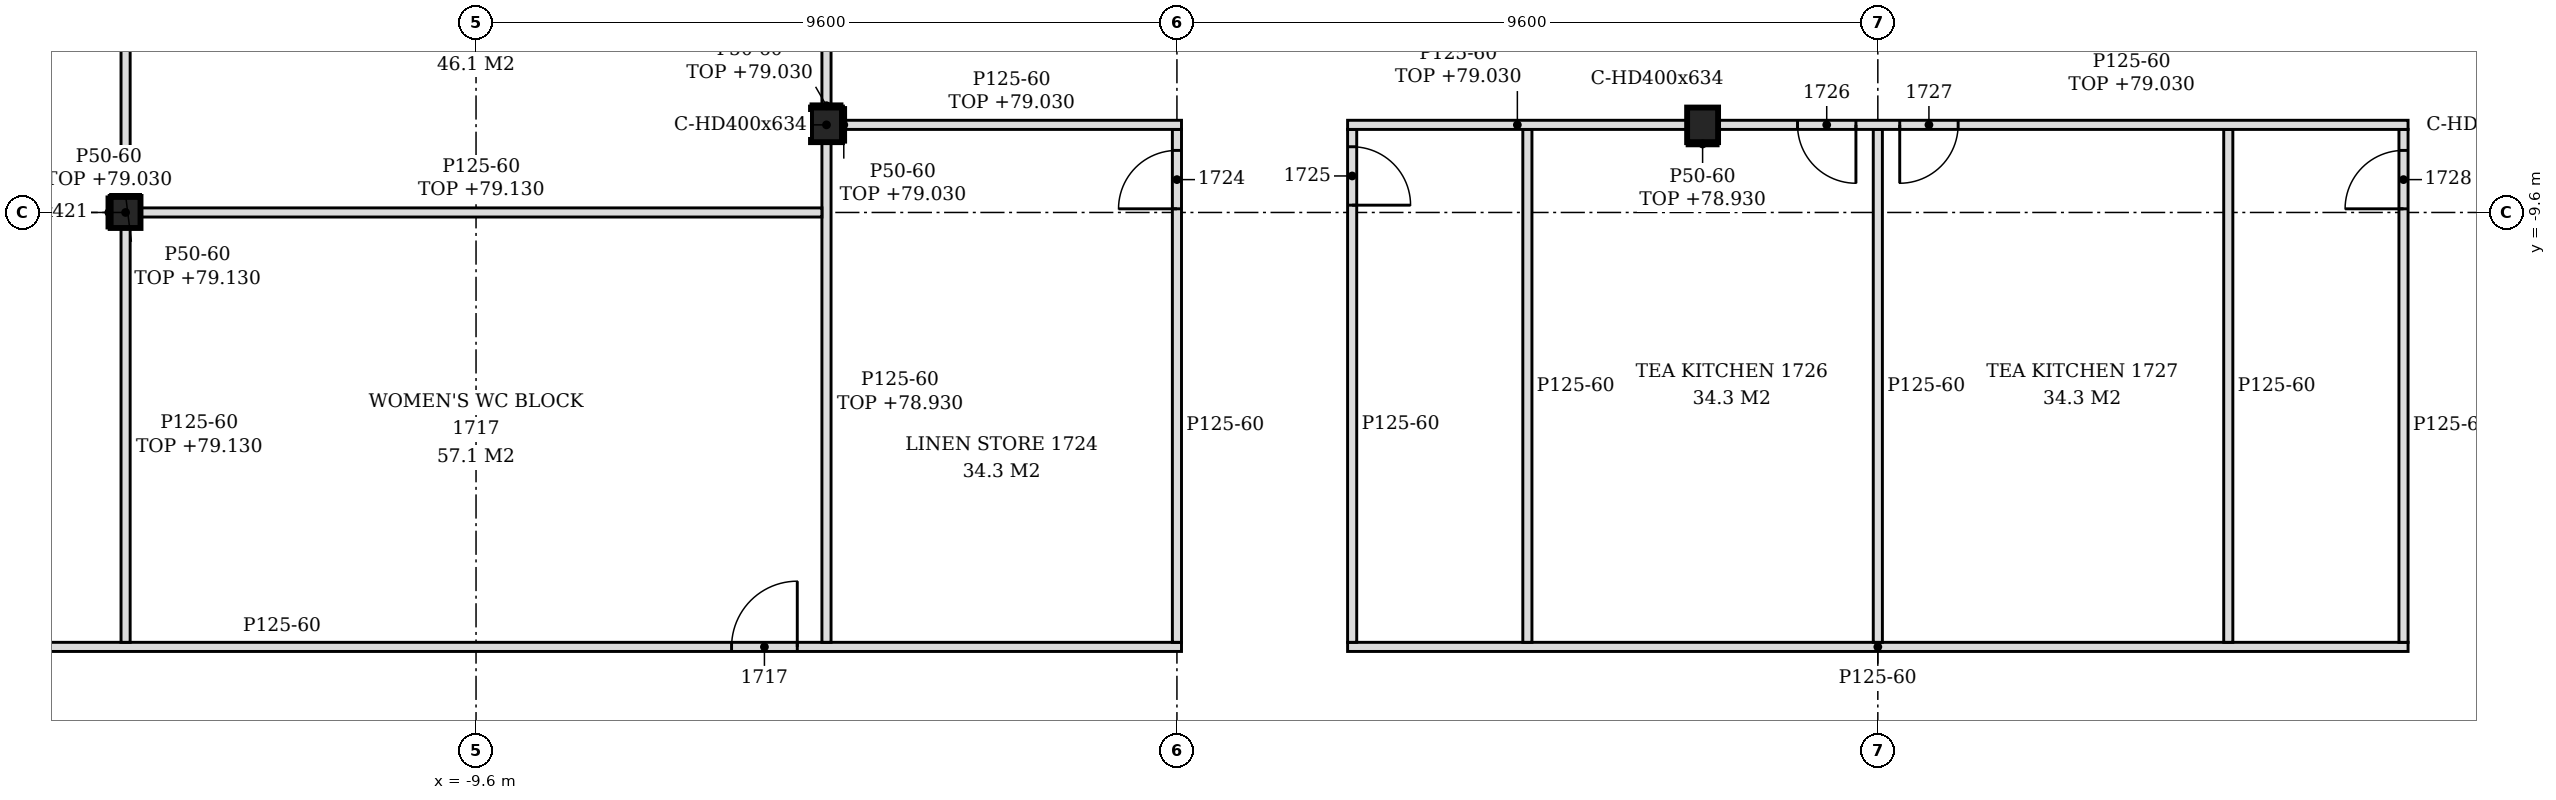
"""IFC4 building model, lengths in metres.
Left out: names, types, materials, properties, quantities, classifications, styles, units other than length and angle.
Written with IfcOpenShell. Run it as: python <this file> out.ifc"""

import sys

from ifc_helpers import new_model, si_unit, direction, frame, frame_2d, origin, origin_2d, place, context, subcontext, project, spatial, polyline, rectangle, i_section, outline, extrude, element, fill, save


model = new_model("IFC4")
c1 = context("Model", 3, precision=1e-05, world=origin(), true_north=direction((0.0, 1.0)))
c2 = subcontext(c1, "Body", "Model", "MODEL_VIEW")
j1 = project(units=[si_unit("LENGTHUNIT", "METRE"), si_unit("PLANEANGLEUNIT", "RADIAN")], contexts=[c1])
p1 = place(None, origin())
s1 = spatial("IfcSite", under=j1, at=p1, CompositionType="ELEMENT")
p2 = place(p1, origin())
s2 = spatial("IfcBuilding", under=s1, at=p2, CompositionType="ELEMENT")
p3 = place(p2, frame((0.0, 0.0, 76.2)))
s3 = spatial("IfcBuildingStorey", under=s2, at=p3, CompositionType="ELEMENT", Elevation=76.2)
for number, where, z_axis, x_axis in (
    (1, (-4.8, -8.4, -0.15), (0.0, 0.0, 1.0), (1.0, 0.0, 0.0)),
    (2, (7.2, -8.4, -0.15), (0.0, 0.0, 1.0), (1.0, 0.0, 0.0)),
):
    element("IfcColumn", number, at=place(p3, frame(where, z_axis=z_axis, x_axis=x_axis)), inside=s3, PredefinedType="COLUMN", context=c2, shape_type="SweptSolid", body=[
        extrude(i_section(OverallWidth=0.424, OverallDepth=0.474, WebThickness=0.048, FlangeThickness=0.077, FilletRadius=0.015, at=origin_2d()), origin(), (0.0, 0.0, 1.0), 3.6),
    ])
p4 = place(p3, frame((-14.4, -9.6, -0.15), z_axis=(0.0, 0.0, 1.0), x_axis=(1.0, 0.0, 0.0)))
e3 = element("IfcColumn", 3, at=p4, inside=s3, PredefinedType="COLUMN", context=c2, shape_type="SweptSolid", body=[
    extrude(i_section(OverallWidth=0.409, OverallDepth=0.425, WebThickness=0.033, FlangeThickness=0.052, FilletRadius=0.015, at=origin_2d()), origin(), (0.0, 0.0, 1.0), 3.6),
])
p5 = place(p3, frame((-18.413, -15.55, 0.0), z_axis=(0.0, 0.0, 1.0), x_axis=(1.0, 0.0, 0.0)))
e4 = element("IfcWall", 4, at=p5, inside=s3, PredefinedType="PARTITIONING", context=c2, shape_type="SweptSolid", body=[
    extrude(outline(polyline([(0.0, 0.0), (18.475, 0.0), (18.475, 3.45), (13.762, 3.45), (13.76, 2.73), (13.462, 2.73), (13.46, 3.45), (4.163, 3.45), (4.16, 2.93), (3.863, 2.93), (3.861, 3.45), (0.0, 3.45), (0.0, 0.0)])), frame((0.0, 0.062, 0.0), z_axis=(0.0, -1.0, 0.0), x_axis=(1.0, 0.0, 0.0)), (0.0, 0.0, 1.0), 0.125),
])
p6 = place(p5, frame((12.312, 0.0, 0.0)))
e5 = element("IfcOpeningElement", 5, at=p6, cuts=e4, PredefinedType="OPENING", context=c2, shape_type="SweptSolid", body=[
    extrude(rectangle(XDim=0.9, YDim=2.1, at=frame_2d((0.45, 1.05))), frame((0.0, 0.073, 0.0), z_axis=(0.0, -1.0, 0.0), x_axis=(1.0, 0.0, 0.0)), (0.0, 0.0, 1.0), 0.145),
])
p7 = place(p3, frame((2.337, -15.55, 0.0), z_axis=(0.0, 0.0, 1.0), x_axis=(1.0, 0.0, 0.0)))
e6 = element("IfcWall", 6, at=p7, inside=s3, PredefinedType="PARTITIONING", context=c2, shape_type="SweptSolid", body=[
    extrude(outline(polyline([(0.0, 0.0), (14.525, 0.0), (14.525, 3.45), (5.012, 3.45), (5.01, 2.73), (4.712, 2.73), (4.71, 3.45), (0.0, 3.45), (0.0, 0.0)])), frame((0.0, 0.062, 0.0), z_axis=(0.0, -1.0, 0.0), x_axis=(1.0, 0.0, 0.0)), (0.0, 0.0, 1.0), 0.125),
])
p8 = place(p3, frame((-14.4, -15.488, 0.0), z_axis=(0.0, 0.0, 1.0), x_axis=(0.0, 1.0, 0.0)))
e7 = element("IfcWall", 7, at=p8, inside=s3, PredefinedType="PARTITIONING", context=c2, shape_type="SweptSolid", body=[
    extrude(rectangle(XDim=5.675, YDim=0.125, at=frame_2d((2.837, 0.0))), origin(), (0.0, 0.0, 1.0), 2.93),
])
p9 = place(p3, frame((-4.8, -15.488, 0.0), z_axis=(0.0, 0.0, 1.0), x_axis=(0.0, 1.0, 0.0)))
e8 = element("IfcWall", 8, at=p9, inside=s3, PredefinedType="PARTITIONING", context=c2, shape_type="SweptSolid", body=[
    extrude(rectangle(XDim=6.851, YDim=0.125, at=frame_2d((3.425, 0.0))), origin(), (0.0, 0.0, 1.0), 2.73),
])
p10 = place(p3, frame((0.0, -15.488, 0.0), z_axis=(0.0, 0.0, 1.0), x_axis=(0.0, 1.0, 0.0)))
e9 = element("IfcWall", 9, at=p10, inside=s3, PredefinedType="PARTITIONING", context=c2, shape_type="SweptSolid", body=[
    extrude(outline(polyline([(0.0, 0.0), (7.025, 0.0), (7.025, 2.83), (6.938, 2.83), (6.936, 3.45), (1.192, 3.45), (1.19, 2.88), (0.982, 2.88), (0.98, 3.45), (0.0, 3.45), (0.0, 0.0)])), frame((0.0, 0.062, 0.0), z_axis=(0.0, -1.0, 0.0), x_axis=(1.0, 0.0, 0.0)), (0.0, 0.0, 1.0), 0.125),
])
p11 = place(p10, frame((5.938, 0.0, 0.0)))
e10 = element("IfcOpeningElement", 10, at=p11, cuts=e9, PredefinedType="OPENING", context=c2, shape_type="SweptSolid", body=[
    extrude(rectangle(XDim=0.8, YDim=2.1, at=frame_2d((0.4, 1.05))), frame((0.0, 0.073, 0.0), z_axis=(0.0, -1.0, 0.0), x_axis=(1.0, 0.0, 0.0)), (0.0, 0.0, 1.0), 0.145),
])
p12 = place(p3, frame((2.4, -15.488, 0.0), z_axis=(0.0, 0.0, 1.0), x_axis=(0.0, 1.0, 0.0)))
e11 = element("IfcWall", 11, at=p12, inside=s3, PredefinedType="PARTITIONING", context=c2, shape_type="SweptSolid", body=[
    extrude(outline(polyline([(0.0, 0.0), (7.025, 0.0), (7.025, 2.83), (6.938, 2.83), (6.936, 3.45), (1.192, 3.45), (1.19, 2.88), (0.982, 2.88), (0.98, 3.45), (0.0, 3.45), (0.0, 0.0)])), frame((0.0, 0.062, 0.0), z_axis=(0.0, -1.0, 0.0), x_axis=(1.0, 0.0, 0.0)), (0.0, 0.0, 1.0), 0.125),
])
p13 = place(p12, frame((5.988, 0.0, 0.0)))
e12 = element("IfcOpeningElement", 12, at=p13, cuts=e11, PredefinedType="OPENING", context=c2, shape_type="SweptSolid", body=[
    extrude(rectangle(XDim=0.8, YDim=2.1, at=frame_2d((0.4, 1.05))), frame((0.0, 0.073, 0.0), z_axis=(0.0, -1.0, 0.0), x_axis=(1.0, 0.0, 0.0)), (0.0, 0.0, 1.0), 0.145),
])
for number, where, z_axis, x_axis in (
    (13, (4.8, -15.488, 0.0), (0.0, 0.0, 1.0), (0.0, 1.0, 0.0)),
    (14, (9.6, -15.488, 0.0), (0.0, 0.0, 1.0), (0.0, 1.0, 0.0)),
    (15, (14.4, -15.488, 0.0), (0.0, 0.0, 1.0), (0.0, 1.0, 0.0)),
):
    element("IfcWall", number, at=place(p3, frame(where, z_axis=z_axis, x_axis=x_axis)), inside=s3, PredefinedType="PARTITIONING", context=c2, shape_type="SweptSolid", body=[
        extrude(outline(polyline([(0.0, 0.0), (7.025, 0.0), (7.025, 2.83), (6.938, 2.83), (6.936, 3.45), (1.192, 3.45), (1.19, 2.88), (0.982, 2.88), (0.98, 3.45), (0.0, 3.45), (0.0, 0.0)])), frame((0.0, 0.062, 0.0), z_axis=(0.0, -1.0, 0.0), x_axis=(1.0, 0.0, 0.0)), (0.0, 0.0, 1.0), 0.125),
    ])
p14 = place(p3, frame((16.8, -15.488, 0.0), z_axis=(0.0, 0.0, 1.0), x_axis=(0.0, 1.0, 0.0)))
e16 = element("IfcWall", 16, at=p14, inside=s3, PredefinedType="PARTITIONING", context=c2, shape_type="SweptSolid", body=[
    extrude(outline(polyline([(0.0, 0.0), (7.025, 0.0), (7.025, 2.83), (6.938, 2.83), (6.936, 3.45), (1.192, 3.45), (1.19, 2.88), (0.982, 2.88), (0.98, 3.45), (0.0, 3.45), (0.0, 0.0)])), frame((0.0, 0.062, 0.0), z_axis=(0.0, -1.0, 0.0), x_axis=(1.0, 0.0, 0.0)), (0.0, 0.0, 1.0), 0.125),
])
p15 = place(p14, frame((5.938, 0.0, 0.0)))
e17 = element("IfcOpeningElement", 17, at=p15, cuts=e16, PredefinedType="OPENING", context=c2, shape_type="SweptSolid", body=[
    extrude(rectangle(XDim=0.8, YDim=2.1, at=frame_2d((0.4, 1.05))), frame((0.0, 0.073, 0.0), z_axis=(0.0, -1.0, 0.0), x_axis=(1.0, 0.0, 0.0)), (0.0, 0.0, 1.0), 0.145),
])
p16 = place(p3, frame((-14.196, -9.6, 0.0), z_axis=(0.0, 0.0, 1.0), x_axis=(1.0, 0.0, 0.0)))
e18 = element("IfcWall", 18, at=p16, inside=s3, PredefinedType="PARTITIONING", context=c2, shape_type="SweptSolid", body=[
    extrude(outline(polyline([(0.0, 0.0), (9.333, 0.0), (9.333, 2.73), (9.246, 2.73), (9.243, 2.93), (0.0, 2.93), (0.0, 0.0)])), frame((0.0, 0.062, 0.0), z_axis=(0.0, -1.0, 0.0), x_axis=(1.0, 0.0, 0.0)), (0.0, 0.0, 1.0), 0.125),
])
p17 = place(p3, frame((-14.4, -9.387, 0.0), z_axis=(0.0, 0.0, 1.0), x_axis=(0.0, 1.0, 0.0)))
e19 = element("IfcWall", 19, at=p17, inside=s3, PredefinedType="PARTITIONING", context=c2, shape_type="SweptSolid", body=[
    extrude(rectangle(XDim=9.175, YDim=0.125, at=frame_2d((4.587, 0.0))), origin(), (0.0, 0.0, 1.0), 2.93),
])
p18 = place(p3, frame((-4.588, -8.4, 0.0), z_axis=(0.0, 0.0, 1.0), x_axis=(1.0, 0.0, 0.0)))
e20 = element("IfcWall", 20, at=p18, inside=s3, PredefinedType="PARTITIONING", context=c2, shape_type="SweptSolid", body=[
    extrude(rectangle(XDim=4.65, YDim=0.125, at=frame_2d((2.325, 0.0))), origin(), (0.0, 0.0, 1.0), 2.83),
])
p19 = place(p3, frame((2.337, -8.4, 0.0), z_axis=(0.0, 0.0, 1.0), x_axis=(1.0, 0.0, 0.0)))
e21 = element("IfcWall", 21, at=p19, inside=s3, PredefinedType="PARTITIONING", context=c2, shape_type="SweptSolid", body=[
    extrude(rectangle(XDim=4.651, YDim=0.125, at=frame_2d((2.325, 0.0))), origin(), (0.0, 0.0, 1.0), 2.83),
])
p20 = place(p3, frame((7.412, -8.4, 0.0), z_axis=(0.0, 0.0, 1.0), x_axis=(1.0, 0.0, 0.0)))
e22 = element("IfcWall", 22, at=p20, inside=s3, PredefinedType="PARTITIONING", context=c2, shape_type="SweptSolid", body=[
    extrude(rectangle(XDim=9.45, YDim=0.125, at=frame_2d((4.725, 0.0))), origin(), (0.0, 0.0, 1.0), 2.83),
])
p21 = place(p20, frame((1.088, 0.0, 0.0)))
e23 = element("IfcOpeningElement", 23, at=p21, cuts=e22, PredefinedType="OPENING", context=c2, shape_type="SweptSolid", body=[
    extrude(rectangle(XDim=0.8, YDim=2.1, at=frame_2d((0.4, 1.05))), frame((0.0, 0.073, 0.0), z_axis=(0.0, -1.0, 0.0), x_axis=(1.0, 0.0, 0.0)), (0.0, 0.0, 1.0), 0.145),
])
p22 = place(p20, frame((2.488, 0.0, 0.0)))
e24 = element("IfcOpeningElement", 24, at=p22, cuts=e22, PredefinedType="OPENING", context=c2, shape_type="SweptSolid", body=[
    extrude(rectangle(XDim=0.8, YDim=2.1, at=frame_2d((0.4, 1.05))), frame((0.0, 0.073, 0.0), z_axis=(0.0, -1.0, 0.0), x_axis=(1.0, 0.0, 0.0)), (0.0, 0.0, 1.0), 0.145),
])
p23 = place(p3, frame((-4.8, -8.163, 0.0), z_axis=(0.0, 0.0, 1.0), x_axis=(0.0, 1.0, 0.0)))
e25 = element("IfcWall", 25, at=p23, inside=s3, PredefinedType="PARTITIONING", context=c2, shape_type="SweptSolid", body=[
    extrude(rectangle(XDim=8.101, YDim=0.125, at=frame_2d((4.05, 0.0))), origin(), (0.0, 0.0, 1.0), 2.83),
])
p24 = place(p23, frame((2.163, 0.0, 0.0)))
e26 = element("IfcOpeningElement", 26, at=p24, cuts=e25, PredefinedType="OPENING", context=c2, shape_type="SweptSolid", body=[
    extrude(rectangle(XDim=0.9, YDim=2.1, at=frame_2d((0.45, 1.05))), frame((0.0, 0.073, 0.0), z_axis=(0.0, -1.0, 0.0), x_axis=(1.0, 0.0, 0.0)), (0.0, 0.0, 1.0), 0.145),
])
p25 = place(p3, frame((-14.629, -9.812, 0.0), z_axis=(0.0, 0.0, 1.0), x_axis=(0.0, 1.0, 0.0)))
e27 = element("IfcWall", 27, at=p25, inside=s3, PredefinedType="PARTITIONING", context=c2, shape_type="SweptSolid", body=[
    extrude(rectangle(XDim=0.425, YDim=0.05, at=frame_2d((0.212, 0.0))), origin(), (0.0, 0.0, 1.0), 2.83),
])
p26 = place(p3, frame((-4.563, -8.637, 0.0), z_axis=(0.0, 0.0, 1.0), x_axis=(0.0, 1.0, 0.0)))
e28 = element("IfcWall", 28, at=p26, inside=s3, PredefinedType="PARTITIONING", context=c2, shape_type="SweptSolid", body=[
    extrude(rectangle(XDim=0.474, YDim=0.05, at=frame_2d((0.237, 0.0))), origin(), (0.0, 0.0, 1.0), 2.83),
])
p27 = place(p3, frame((-14.604, -9.363, 0.0), z_axis=(0.0, 0.0, 1.0), x_axis=(1.0, 0.0, 0.0)))
e29 = element("IfcWall", 29, at=p27, inside=s3, PredefinedType="PARTITIONING", context=c2, shape_type="SweptSolid", body=[
    extrude(rectangle(XDim=0.409, YDim=0.05, at=frame_2d((0.205, 0.0))), origin(), (0.0, 0.0, 1.0), 2.93),
])
p28 = place(p3, frame((-5.012, -8.138, 0.0), z_axis=(0.0, 0.0, 1.0), x_axis=(1.0, 0.0, 0.0)))
e30 = element("IfcWall", 30, at=p28, inside=s3, PredefinedType="PARTITIONING", context=c2, shape_type="SweptSolid", body=[
    extrude(rectangle(XDim=0.424, YDim=0.05, at=frame_2d((0.212, 0.0))), origin(), (0.0, 0.0, 1.0), 2.83),
])
p29 = place(p3, frame((6.988, -8.662, 0.0), z_axis=(0.0, 0.0, 1.0), x_axis=(1.0, 0.0, 0.0)))
e31 = element("IfcWall", 31, at=p29, inside=s3, PredefinedType="PARTITIONING", context=c2, shape_type="SweptSolid", body=[
    extrude(rectangle(XDim=0.424, YDim=0.05, at=frame_2d((0.212, 0.0))), origin(), (0.0, 0.0, 1.0), 2.73),
])
p30 = place(p6, origin())
e32 = element("IfcDoor", 32, at=p30, inside=s3, OperationType="SINGLE_SWING_RIGHT", PredefinedType="DOOR", context=c2, shape_type="SweptSolid", body=[
    extrude(rectangle(XDim=0.9, YDim=2.1, at=frame_2d((0.45, 1.05))), frame((0.0, 0.025, 0.0), z_axis=(0.0, -1.0, 0.0), x_axis=(1.0, 0.0, 0.0)), (0.0, 0.0, 1.0), 0.05),
])
fill(e5, e32)
p31 = place(p11, origin())
e33 = element("IfcDoor", 33, at=p31, inside=s3, OperationType="SINGLE_SWING_LEFT", PredefinedType="DOOR", context=c2, shape_type="SweptSolid", body=[
    extrude(rectangle(XDim=0.8, YDim=2.1, at=frame_2d((0.4, 1.05))), frame((0.0, 0.025, 0.0), z_axis=(0.0, -1.0, 0.0), x_axis=(1.0, 0.0, 0.0)), (0.0, 0.0, 1.0), 0.05),
])
fill(e10, e33)
p32 = place(p13, frame((0.8, 0.0, 0.0), z_axis=(0.0, 0.0, 1.0), x_axis=(-1.0, 0.0, 0.0)))
e34 = element("IfcDoor", 34, at=p32, inside=s3, OperationType="SINGLE_SWING_RIGHT", PredefinedType="DOOR", context=c2, shape_type="SweptSolid", body=[
    extrude(rectangle(XDim=0.8, YDim=2.1, at=frame_2d((0.4, 1.05))), frame((0.0, 0.025, 0.0), z_axis=(0.0, -1.0, 0.0), x_axis=(1.0, 0.0, 0.0)), (0.0, 0.0, 1.0), 0.05),
])
fill(e12, e34)
p33 = place(p21, frame((0.8, 0.0, 0.0), z_axis=(0.0, 0.0, 1.0), x_axis=(-1.0, 0.0, 0.0)))
e35 = element("IfcDoor", 35, at=p33, inside=s3, OperationType="SINGLE_SWING_LEFT", PredefinedType="DOOR", context=c2, shape_type="SweptSolid", body=[
    extrude(rectangle(XDim=0.8, YDim=2.1, at=frame_2d((0.4, 1.05))), frame((0.0, 0.025, 0.0), z_axis=(0.0, -1.0, 0.0), x_axis=(1.0, 0.0, 0.0)), (0.0, 0.0, 1.0), 0.05),
])
fill(e23, e35)
p34 = place(p22, frame((0.8, 0.0, 0.0), z_axis=(0.0, 0.0, 1.0), x_axis=(-1.0, 0.0, 0.0)))
e36 = element("IfcDoor", 36, at=p34, inside=s3, OperationType="SINGLE_SWING_RIGHT", PredefinedType="DOOR", context=c2, shape_type="SweptSolid", body=[
    extrude(rectangle(XDim=0.8, YDim=2.1, at=frame_2d((0.4, 1.05))), frame((0.0, 0.025, 0.0), z_axis=(0.0, -1.0, 0.0), x_axis=(1.0, 0.0, 0.0)), (0.0, 0.0, 1.0), 0.05),
])
fill(e24, e36)
p35 = place(p15, origin())
e37 = element("IfcDoor", 37, at=p35, inside=s3, OperationType="SINGLE_SWING_LEFT", PredefinedType="DOOR", context=c2, shape_type="SweptSolid", body=[
    extrude(rectangle(XDim=0.8, YDim=2.1, at=frame_2d((0.4, 1.05))), frame((0.0, 0.025, 0.0), z_axis=(0.0, -1.0, 0.0), x_axis=(1.0, 0.0, 0.0)), (0.0, 0.0, 1.0), 0.05),
])
fill(e17, e37)
save(model, sys.argv[1])
